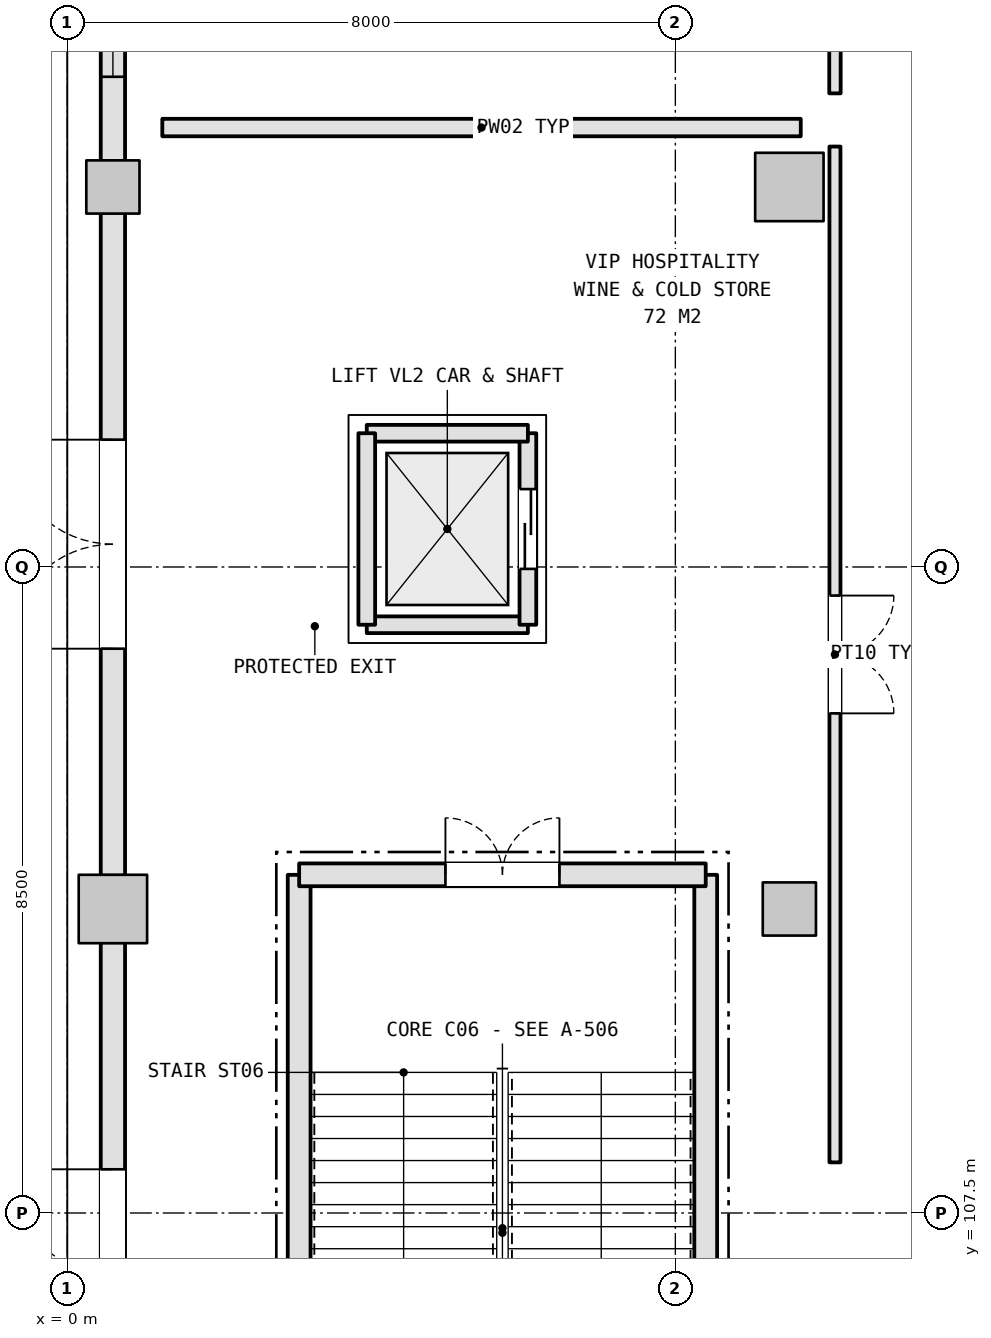
"""IFC4 building model, lengths in metres.
Left out: names, types, materials, properties, quantities, classifications, styles, units other than length and angle.
Written with IfcOpenShell. Run it as: python <this file> out.ifc"""

import sys

from ifc_helpers import new_model, si_unit, direction, frame, frame_2d, origin, origin_2d, place, context, subcontext, project, spatial, rectangle, extrude, element, fill, save


model = new_model("IFC4")
c1 = context("Model", 3, precision=1e-05, world=origin(), true_north=direction((0.0, 1.0)))
c2 = subcontext(c1, "Body", "Model", "MODEL_VIEW")
j1 = project(units=[si_unit("LENGTHUNIT", "METRE"), si_unit("PLANEANGLEUNIT", "RADIAN")], contexts=[c1])
p1 = place(None, origin())
s1 = spatial("IfcSite", under=j1, at=p1, CompositionType="ELEMENT")
p2 = place(p1, origin())
s2 = spatial("IfcBuilding", under=s1, at=p2, CompositionType="ELEMENT")
p3 = place(p2, origin())
s3 = spatial("IfcBuildingStorey", under=s2, at=p3, CompositionType="ELEMENT", Elevation=0.0)
p4 = place(p3, frame((0.6, 111.5, 0.0), z_axis=(0.0, 0.0, 1.0), x_axis=(1.0, 0.0, 0.0)))
e1 = element("IfcColumn", 1, at=p4, inside=s3, PredefinedType="COLUMN", context=c2, shape_type="SweptSolid", body=[
    extrude(rectangle(XDim=0.9, YDim=0.9, at=origin_2d()), origin(), (0.0, 0.0, 1.0), 5.4),
])
for number, where, z_axis, x_axis in (
    (2, (0.6, 121.0, 0.0), (0.0, 0.0, 1.0), (1.0, 0.0, 0.0)),
    (3, (9.5, 111.5, 0.0), (0.0, 0.0, 1.0), (1.0, 0.0, 0.0)),
):
    element("IfcColumn", number, at=place(p3, frame(where, z_axis=z_axis, x_axis=x_axis)), inside=s3, PredefinedType="COLUMN", context=c2, shape_type="SweptSolid", body=[
        extrude(rectangle(XDim=0.7, YDim=0.7, at=origin_2d()), origin(), (0.0, 0.0, 1.0), 5.4),
    ])
p5 = place(p3, frame((9.5, 121.0, 0.0), z_axis=(0.0, 0.0, 1.0), x_axis=(1.0, 0.0, 0.0)))
e4 = element("IfcColumn", 4, at=p5, inside=s3, PredefinedType="COLUMN", context=c2, shape_type="SweptSolid", body=[
    extrude(rectangle(XDim=0.9, YDim=0.9, at=origin_2d()), origin(), (0.0, 0.0, 1.0), 5.4),
])
p6 = place(p3, frame((0.6, 102.338, 0.0), z_axis=(0.0, 0.0, 1.0), x_axis=(0.0, 1.0, 0.0)))
e5 = element("IfcWall", 5, at=p6, inside=s3, PredefinedType="SOLIDWALL", context=c2, shape_type="SweptSolid", body=[
    extrude(rectangle(XDim=8.724, YDim=0.32, at=frame_2d((4.362, 0.0))), origin(), (0.0, 0.0, 1.0), 4.475),
])
p7 = place(p6, frame((2.987, 0.0, 0.0)))
e6 = element("IfcOpeningElement", 6, at=p7, cuts=e5, PredefinedType="OPENING", context=c2, shape_type="SweptSolid", body=[
    extrude(rectangle(XDim=2.75, YDim=2.4, at=frame_2d((1.375, 1.2))), frame((0.0, 0.17, 0.0), z_axis=(0.0, -1.0, 0.0), x_axis=(1.0, 0.0, 0.0)), (0.0, 0.0, 1.0), 0.34),
])
p8 = place(p3, frame((0.6, 111.938, 0.0), z_axis=(0.0, 0.0, 1.0), x_axis=(0.0, 1.0, 0.0)))
e7 = element("IfcWall", 7, at=p8, inside=s3, PredefinedType="SOLIDWALL", context=c2, shape_type="SweptSolid", body=[
    extrude(rectangle(XDim=8.724, YDim=0.32, at=frame_2d((4.362, 0.0))), origin(), (0.0, 0.0, 1.0), 4.475),
])
p9 = place(p8, frame((2.987, 0.0, 0.0)))
e8 = element("IfcOpeningElement", 8, at=p9, cuts=e7, PredefinedType="OPENING", context=c2, shape_type="SweptSolid", body=[
    extrude(rectangle(XDim=2.75, YDim=2.4, at=frame_2d((1.375, 1.2))), frame((0.0, 0.17, 0.0), z_axis=(0.0, -1.0, 0.0), x_axis=(1.0, 0.0, 0.0)), (0.0, 0.0, 1.0), 0.34),
])
p10 = place(p3, frame((0.6, 121.338, 0.0), z_axis=(0.0, 0.0, 1.0), x_axis=(0.0, 1.0, 0.0)))
e9 = element("IfcWall", 9, at=p10, inside=s3, PredefinedType="SOLIDWALL", context=c2, shape_type="SweptSolid", body=[
    extrude(rectangle(XDim=3.724, YDim=0.32, at=frame_2d((1.862, 0.0))), origin(), (0.0, 0.0, 1.0), 4.475),
])
p11 = place(p10, frame((1.112, 0.0, 1.05)))
e10 = element("IfcOpeningElement", 10, at=p11, cuts=e9, PredefinedType="OPENING", context=c2, shape_type="SweptSolid", body=[
    extrude(rectangle(XDim=1.5, YDim=1.5, at=frame_2d((0.75, 0.75))), frame((0.0, 0.17, 0.0), z_axis=(0.0, -1.0, 0.0), x_axis=(1.0, 0.0, 0.0)), (0.0, 0.0, 1.0), 0.34),
])
for number, where, z_axis, x_axis in (
    (11, (3.05, 111.95, 0.0), (0.0, 0.0, 1.0), (0.0, -1.0, 0.0)),
    (12, (8.4, 102.65, 0.0), (0.0, 0.0, 1.0), (0.0, 1.0, 0.0)),
):
    element("IfcWall", number, at=place(p3, frame(where, z_axis=z_axis, x_axis=x_axis)), inside=s3, PredefinedType="SHEAR", context=c2, shape_type="SweptSolid", body=[
        extrude(rectangle(XDim=9.299, YDim=0.3, at=frame_2d((4.65, 0.0))), origin(), (0.0, 0.0, 1.0), 5.14),
    ])
p12 = place(p3, frame((8.4, 111.95, 0.0), z_axis=(0.0, 0.0, 1.0), x_axis=(-1.0, 0.0, 0.0)))
e13 = element("IfcWall", 13, at=p12, inside=s3, PredefinedType="SHEAR", context=c2, shape_type="SweptSolid", body=[
    extrude(rectangle(XDim=5.349, YDim=0.3, at=frame_2d((2.675, 0.0))), origin(), (0.0, 0.0, 1.0), 5.14),
])
p13 = place(p12, frame((1.925, 0.0, 0.0)))
e14 = element("IfcOpeningElement", 14, at=p13, cuts=e13, PredefinedType="OPENING", context=c2, shape_type="SweptSolid", body=[
    extrude(rectangle(XDim=1.5, YDim=2.2, at=frame_2d((0.75, 1.1))), frame((0.0, 0.16, 0.0), z_axis=(0.0, -1.0, 0.0), x_axis=(1.0, 0.0, 0.0)), (0.0, 0.0, 1.0), 0.32),
])
p14 = place(p3, frame((3.94, 115.24, -1.1), z_axis=(0.0, 0.0, 1.0), x_axis=(1.0, 0.0, 0.0)))
e15 = element("IfcWall", 15, at=p14, inside=s3, PredefinedType="SHEAR", context=c2, shape_type="SweptSolid", body=[
    extrude(rectangle(XDim=2.12, YDim=0.22, at=frame_2d((1.06, 0.0))), origin(), (0.0, 0.0, 1.0), 6.24),
])
p15 = place(p3, frame((6.06, 115.24, -1.1), z_axis=(0.0, 0.0, 1.0), x_axis=(0.0, 1.0, 0.0)))
e16 = element("IfcWall", 16, at=p15, inside=s3, PredefinedType="SHEAR", context=c2, shape_type="SweptSolid", body=[
    extrude(rectangle(XDim=2.52, YDim=0.22, at=frame_2d((1.26, 0.0))), origin(), (0.0, 0.0, 1.0), 6.24),
])
p16 = place(p15, frame((0.735, 0.0, 1.1)))
e17 = element("IfcOpeningElement", 17, at=p16, cuts=e16, PredefinedType="OPENING", context=c2, shape_type="SweptSolid", body=[
    extrude(rectangle(XDim=1.05, YDim=2.15, at=frame_2d((0.525, 1.075))), frame((0.0, 0.12, 0.0), z_axis=(0.0, -1.0, 0.0), x_axis=(1.0, 0.0, 0.0)), (0.0, 0.0, 1.0), 0.24),
])
p17 = place(p3, frame((6.06, 117.76, -1.1), z_axis=(0.0, 0.0, 1.0), x_axis=(-1.0, 0.0, 0.0)))
e18 = element("IfcWall", 18, at=p17, inside=s3, PredefinedType="SHEAR", context=c2, shape_type="SweptSolid", body=[
    extrude(rectangle(XDim=2.12, YDim=0.22, at=frame_2d((1.06, 0.0))), origin(), (0.0, 0.0, 1.0), 6.24),
])
p18 = place(p3, frame((3.94, 117.76, -1.1), z_axis=(0.0, 0.0, 1.0), x_axis=(0.0, -1.0, 0.0)))
e19 = element("IfcWall", 19, at=p18, inside=s3, PredefinedType="SHEAR", context=c2, shape_type="SweptSolid", body=[
    extrude(rectangle(XDim=2.52, YDim=0.22, at=frame_2d((1.26, 0.0))), origin(), (0.0, 0.0, 1.0), 6.24),
])
p19 = place(p3, frame((10.1, 121.532, 0.0), z_axis=(0.0, 0.0, 1.0), x_axis=(0.0, -1.0, 0.0)))
e20 = element("IfcWall", 20, at=p19, inside=s3, PredefinedType="PARTITIONING", context=c2, shape_type="SweptSolid", body=[
    extrude(rectangle(XDim=13.366, YDim=0.145, at=frame_2d((6.683, 0.0))), origin(), (0.0, 0.0, 1.0), 4.668),
])
p20 = place(p19, frame((5.908, 0.0, 0.0)))
e21 = element("IfcOpeningElement", 21, at=p20, cuts=e20, PredefinedType="OPENING", context=c2, shape_type="SweptSolid", body=[
    extrude(rectangle(XDim=1.55, YDim=2.15, at=frame_2d((0.775, 1.075))), frame((0.0, 0.083, 0.0), z_axis=(0.0, -1.0, 0.0), x_axis=(1.0, 0.0, 0.0)), (0.0, 0.0, 1.0), 0.165),
])
p21 = place(p3, frame((1.25, 121.782, 0.0), z_axis=(0.0, 0.0, 1.0), x_axis=(1.0, 0.0, 0.0)))
e22 = element("IfcWall", 22, at=p21, inside=s3, PredefinedType="PLUMBINGWALL", context=c2, shape_type="SweptSolid", body=[
    extrude(rectangle(XDim=8.4, YDim=0.23, at=frame_2d((4.2, 0.0))), origin(), (0.0, 0.0, 1.0), 4.475),
])
p22 = place(p3, frame((10.1, 129.57, 0.0), z_axis=(0.0, 0.0, 1.0), x_axis=(0.0, -1.0, 0.0)))
e23 = element("IfcWall", 23, at=p22, inside=s3, PredefinedType="PARTITIONING", context=c2, shape_type="SweptSolid", body=[
    extrude(rectangle(XDim=7.338, YDim=0.15, at=frame_2d((3.669, 0.0))), origin(), (0.0, 0.0, 1.0), 4.668),
])
p23 = place(p22, frame((2.294, 0.0, 0.0)))
e24 = element("IfcOpeningElement", 24, at=p23, cuts=e23, PredefinedType="OPENING", context=c2, shape_type="SweptSolid", body=[
    extrude(rectangle(XDim=1.15, YDim=2.2, at=frame_2d((0.575, 1.1))), frame((0.0, 0.085, 0.0), z_axis=(0.0, -1.0, 0.0), x_axis=(1.0, 0.0, 0.0)), (0.0, 0.0, 1.0), 0.17),
])
p24 = place(p7, origin())
e25 = element("IfcDoor", 25, at=p24, inside=s3, OperationType="DOUBLE_DOOR_SINGLE_SWING", PredefinedType="DOOR", context=c2, shape_type="SweptSolid", body=[
    extrude(rectangle(XDim=2.75, YDim=2.4, at=frame_2d((1.375, 1.2))), frame((0.0, 0.025, 0.0), z_axis=(0.0, -1.0, 0.0), x_axis=(1.0, 0.0, 0.0)), (0.0, 0.0, 1.0), 0.05),
])
fill(e6, e25)
p25 = place(p9, origin())
e26 = element("IfcDoor", 26, at=p25, inside=s3, OperationType="DOUBLE_DOOR_SINGLE_SWING", PredefinedType="DOOR", context=c2, shape_type="SweptSolid", body=[
    extrude(rectangle(XDim=2.75, YDim=2.4, at=frame_2d((1.375, 1.2))), frame((0.0, 0.025, 0.0), z_axis=(0.0, -1.0, 0.0), x_axis=(1.0, 0.0, 0.0)), (0.0, 0.0, 1.0), 0.05),
])
fill(e8, e26)
p26 = place(p11, origin())
e27 = element("IfcWindow", 27, at=p26, inside=s3, PartitioningType="SINGLE_PANEL", PredefinedType="WINDOW", context=c2, shape_type="SweptSolid", body=[
    extrude(rectangle(XDim=1.5, YDim=1.5, at=frame_2d((0.75, 0.75))), frame((0.0, 0.03, 0.0), z_axis=(0.0, -1.0, 0.0), x_axis=(1.0, 0.0, 0.0)), (0.0, 0.0, 1.0), 0.06),
])
fill(e10, e27)
p27 = place(p13, frame((1.5, 0.0, 0.0), z_axis=(0.0, 0.0, 1.0), x_axis=(-1.0, 0.0, 0.0)))
e28 = element("IfcDoor", 28, at=p27, inside=s3, OperationType="DOUBLE_DOOR_SINGLE_SWING", PredefinedType="DOOR", context=c2, shape_type="SweptSolid", body=[
    extrude(rectangle(XDim=1.5, YDim=2.2, at=frame_2d((0.75, 1.1))), frame((0.0, 0.025, 0.0), z_axis=(0.0, -1.0, 0.0), x_axis=(1.0, 0.0, 0.0)), (0.0, 0.0, 1.0), 0.05),
])
fill(e14, e28)
p28 = place(p16, origin())
e29 = element("IfcDoor", 29, at=p28, inside=s3, OperationType="DOUBLE_DOOR_SLIDING", PredefinedType="DOOR", context=c2, shape_type="SweptSolid", body=[
    extrude(rectangle(XDim=1.05, YDim=2.15, at=frame_2d((0.525, 1.075))), frame((0.0, 0.025, 0.0), z_axis=(0.0, -1.0, 0.0), x_axis=(1.0, 0.0, 0.0)), (0.0, 0.0, 1.0), 0.05),
])
fill(e17, e29)
p29 = place(p20, origin())
e30 = element("IfcDoor", 30, at=p29, inside=s3, OperationType="DOUBLE_DOOR_SINGLE_SWING", PredefinedType="DOOR", context=c2, shape_type="SweptSolid", body=[
    extrude(rectangle(XDim=1.55, YDim=2.15, at=frame_2d((0.775, 1.075))), frame((0.0, 0.025, 0.0), z_axis=(0.0, -1.0, 0.0), x_axis=(1.0, 0.0, 0.0)), (0.0, 0.0, 1.0), 0.05),
])
fill(e21, e30)
save(model, sys.argv[1])
